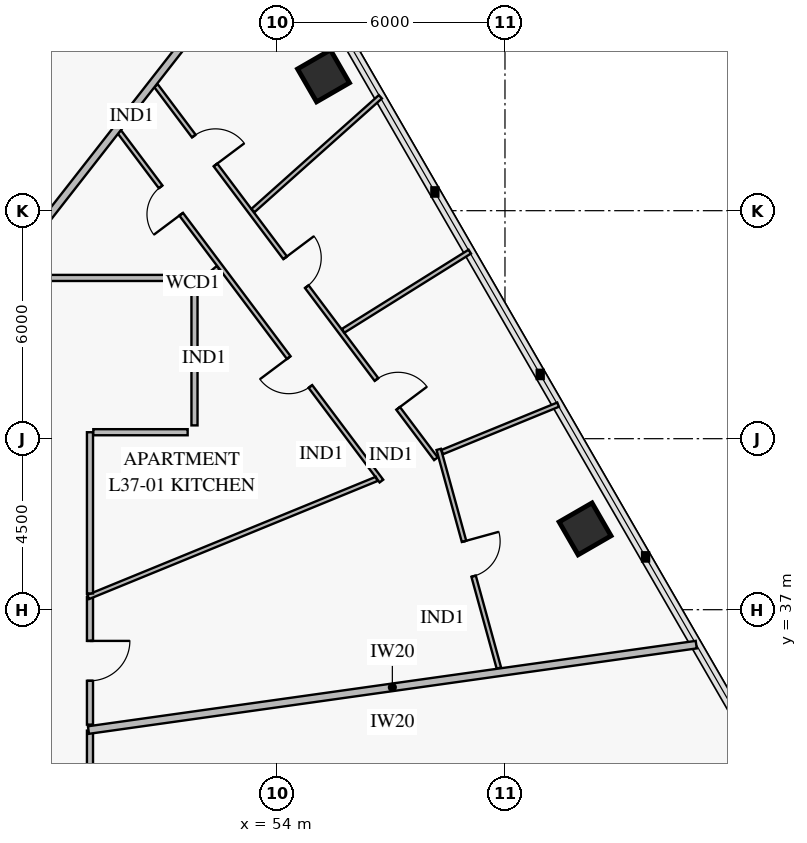
"""IFC4 building model, lengths in metres.
Left out: names, types, materials, properties, quantities, classifications, styles, units other than length and angle.
Written with IfcOpenShell. Run it as: python <this file> out.ifc"""

import sys

from ifc_helpers import new_model, si_unit, direction, frame, frame_2d, origin, origin_2d, place, context, subcontext, project, spatial, rectangle, extrude, element, fill, save


model = new_model("IFC4")
c1 = context("Model", 3, precision=1e-05, world=origin(), true_north=direction((0.0, 1.0)))
c2 = subcontext(c1, "Body", "Model", "MODEL_VIEW")
j1 = project(units=[si_unit("LENGTHUNIT", "METRE"), si_unit("PLANEANGLEUNIT", "RADIAN")], contexts=[c1])
p1 = place(None, origin())
s1 = spatial("IfcSite", under=j1, at=p1, CompositionType="ELEMENT")
p2 = place(p1, origin())
s2 = spatial("IfcBuilding", under=s1, at=p2, CompositionType="ELEMENT")
p3 = place(p2, frame((0.0, 0.0, 150.4)))
s3 = spatial("IfcBuildingStorey", under=s2, at=p3, CompositionType="ELEMENT", Elevation=150.4)
for number, where, z_axis, x_axis in (
    (1, (62.108, 39.126, 0.0), (0.0, 0.0, 1.0), (-0.5, 0.866, 0.0)),
    (2, (55.226, 51.047, 0.0), (0.0, 0.0, 1.0), (-0.5, 0.866, 0.0)),
):
    element("IfcColumn", number, at=place(p3, frame(where, z_axis=z_axis, x_axis=x_axis)), inside=s3, PredefinedType="COLUMN", context=c2, shape_type="SweptSolid", body=[
        extrude(rectangle(XDim=1.0, YDim=1.0, at=origin_2d()), origin(), (0.0, 0.0, 1.0), 3.55),
    ])
p4 = place(p3, frame((59.84, 35.462, 0.0), z_axis=(0.0, 0.0, 1.0), x_axis=(-0.265206859365, 0.964191537894, 0.0)))
e3 = element("IfcWall", 3, at=p4, inside=s3, PredefinedType="PARTITIONING", context=c2, shape_type="SweptSolid", body=[
    extrude(rectangle(XDim=5.97, YDim=0.12, at=frame_2d((2.985, 0.0))), origin(), (0.0, 0.0, 1.0), 2.9),
])
p5 = place(p4, frame((2.51, 0.0, 0.0)))
e4 = element("IfcOpeningElement", 4, at=p5, cuts=e3, PredefinedType="OPENING", context=c2, shape_type="SweptSolid", body=[
    extrude(rectangle(XDim=0.95, YDim=2.1, at=frame_2d((0.475, 1.05))), frame((0.0, 0.072, 0.0), z_axis=(0.0, -1.0, 0.0), x_axis=(1.0, 0.0, 0.0)), (0.0, 0.0, 1.0), 0.144),
])
p6 = place(p3, frame((56.748, 40.385, 0.0), z_axis=(0.0, 0.0, 1.0), x_axis=(-0.600156370002, 0.799882698616, 0.0)))
e5 = element("IfcWall", 5, at=p6, inside=s3, PredefinedType="PARTITIONING", context=c2, shape_type="SweptSolid", body=[
    extrude(rectangle(XDim=11.49, YDim=0.12, at=frame_2d((5.745, 0.0))), origin(), (0.0, 0.0, 1.0), 2.9),
])
p7 = place(p6, frame((3.112, 0.0, 0.0)))
e6 = element("IfcOpeningElement", 6, at=p7, cuts=e5, PredefinedType="OPENING", context=c2, shape_type="SweptSolid", body=[
    extrude(rectangle(XDim=0.95, YDim=2.1, at=frame_2d((0.475, 1.05))), frame((0.0, 0.072, 0.0), z_axis=(0.0, -1.0, 0.0), x_axis=(1.0, 0.0, 0.0)), (0.0, 0.0, 1.0), 0.144),
])
p8 = place(p6, frame((8.779, 0.0, 0.0)))
e7 = element("IfcOpeningElement", 7, at=p8, cuts=e5, PredefinedType="OPENING", context=c2, shape_type="SweptSolid", body=[
    extrude(rectangle(XDim=0.9, YDim=2.1, at=frame_2d((0.45, 1.05))), frame((0.0, 0.072, 0.0), z_axis=(0.0, -1.0, 0.0), x_axis=(1.0, 0.0, 0.0)), (0.0, 0.0, 1.0), 0.144),
])
p9 = place(p3, frame((58.183, 40.972, 0.0), z_axis=(0.0, 0.0, 1.0), x_axis=(-0.600136851624, 0.79989734299, 0.0)))
e8 = element("IfcWall", 8, at=p9, inside=s3, PredefinedType="PARTITIONING", context=c2, shape_type="SweptSolid", body=[
    extrude(rectangle(XDim=12.273, YDim=0.12, at=frame_2d((6.136, 0.0))), origin(), (0.0, 0.0, 1.0), 2.9),
])
p10 = place(p9, frame((1.657, 0.0, 0.0)))
e9 = element("IfcOpeningElement", 9, at=p10, cuts=e8, PredefinedType="OPENING", context=c2, shape_type="SweptSolid", body=[
    extrude(rectangle(XDim=0.95, YDim=2.1, at=frame_2d((0.475, 1.05))), frame((0.0, 0.072, 0.0), z_axis=(0.0, -1.0, 0.0), x_axis=(1.0, 0.0, 0.0)), (0.0, 0.0, 1.0), 0.144),
])
p11 = place(p9, frame((5.662, 0.0, 0.0)))
e10 = element("IfcOpeningElement", 10, at=p11, cuts=e8, PredefinedType="OPENING", context=c2, shape_type="SweptSolid", body=[
    extrude(rectangle(XDim=0.95, YDim=2.1, at=frame_2d((0.475, 1.05))), frame((0.0, 0.072, 0.0), z_axis=(0.0, -1.0, 0.0), x_axis=(1.0, 0.0, 0.0)), (0.0, 0.0, 1.0), 0.144),
])
p12 = place(p9, frame((9.666, 0.0, 0.0)))
e11 = element("IfcOpeningElement", 11, at=p12, cuts=e8, PredefinedType="OPENING", context=c2, shape_type="SweptSolid", body=[
    extrude(rectangle(XDim=0.95, YDim=2.1, at=frame_2d((0.475, 1.05))), frame((0.0, 0.072, 0.0), z_axis=(0.0, -1.0, 0.0), x_axis=(1.0, 0.0, 0.0)), (0.0, 0.0, 1.0), 0.144),
])
p13 = place(p3, frame((49.08, 33.975, 0.0), z_axis=(0.0, 0.0, 1.0), x_axis=(0.0, 1.0, 0.0)))
e12 = element("IfcWall", 12, at=p13, inside=s3, PredefinedType="PARTITIONING", context=c2, shape_type="SweptSolid", body=[
    extrude(rectangle(XDim=3.357, YDim=0.16, at=frame_2d((1.679, 0.0))), origin(), (0.0, 0.0, 1.0), 2.9),
])
p14 = place(p13, frame((1.154, 0.0, 0.0)))
e13 = element("IfcOpeningElement", 13, at=p14, cuts=e12, PredefinedType="OPENING", context=c2, shape_type="SweptSolid", body=[
    extrude(rectangle(XDim=1.05, YDim=2.15, at=frame_2d((0.525, 1.075))), frame((0.0, 0.092, 0.0), z_axis=(0.0, -1.0, 0.0), x_axis=(1.0, 0.0, 0.0)), (0.0, 0.0, 1.0), 0.184),
])
p15 = place(p3, frame((49.08, 30.8, 0.0), z_axis=(0.0, 0.0, 1.0), x_axis=(0.0, 1.0, 0.0)))
e14 = element("IfcWall", 14, at=p15, inside=s3, PredefinedType="PARTITIONING", context=c2, shape_type="SweptSolid", body=[
    extrude(rectangle(XDim=3.018, YDim=0.16, at=frame_2d((1.509, 0.0))), origin(), (0.0, 0.0, 1.0), 3.55),
])
p16 = place(p15, frame((0.934, 0.0, 0.0)))
e15 = element("IfcOpeningElement", 15, at=p16, cuts=e14, PredefinedType="OPENING", context=c2, shape_type="SweptSolid", body=[
    extrude(rectangle(XDim=1.15, YDim=2.2, at=frame_2d((0.575, 1.1))), frame((0.0, 0.092, 0.0), z_axis=(0.0, -1.0, 0.0), x_axis=(1.0, 0.0, 0.0)), (0.0, 0.0, 1.0), 0.184),
])
p17 = place(p3, frame((49.04, 33.833, 0.0), z_axis=(0.0, 0.0, 1.0), x_axis=(0.990268626923, 0.139169129232, 0.0)))
e16 = element("IfcWall", 16, at=p17, inside=s3, PredefinedType="PARTITIONING", context=c2, shape_type="SweptSolid", body=[
    extrude(rectangle(XDim=16.15, YDim=0.2, at=frame_2d((8.075, 0.0))), origin(), (0.0, 0.0, 1.0), 2.87),
])
p18 = place(p3, frame((51.78, 45.425, 0.0), z_axis=(0.0, 0.0, 1.0), x_axis=(0.761652645913, 0.647985529911, 0.0)))
e17 = element("IfcWall", 17, at=p18, inside=s3, PredefinedType="PARTITIONING", context=c2, shape_type="SweptSolid", body=[
    extrude(rectangle(XDim=0.883, YDim=0.12, at=frame_2d((0.441, 0.0))), origin(), (0.0, 0.0, 1.0), 3.55),
])
p19 = place(p3, frame((55.741, 44.339, 0.0), z_axis=(0.0, 0.0, 1.0), x_axis=(0.847998304005, 0.529998940003, 0.0)))
e18 = element("IfcWall", 18, at=p19, inside=s3, PredefinedType="PARTITIONING", context=c2, shape_type="SweptSolid", body=[
    extrude(rectangle(XDim=3.929, YDim=0.12, at=frame_2d((1.965, 0.0))), origin(), (0.0, 0.0, 1.0), 2.87),
])
p20 = place(p3, frame((53.368, 47.503, 0.0), z_axis=(0.0, 0.0, 1.0), x_axis=(0.746002225815, 0.665943450361, 0.0)))
e19 = element("IfcWall", 19, at=p20, inside=s3, PredefinedType="PARTITIONING", context=c2, shape_type="SweptSolid", body=[
    extrude(rectangle(XDim=4.495, YDim=0.12, at=frame_2d((2.248, 0.0))), origin(), (0.0, 0.0, 1.0), 2.87),
])
p21 = place(p3, frame((49.032, 37.334, 0.0), z_axis=(0.0, 0.0, 1.0), x_axis=(0.92547579993, 0.378806736666, 0.0)))
e20 = element("IfcWall", 20, at=p21, inside=s3, PredefinedType="PARTITIONING", context=c2, shape_type="SweptSolid", body=[
    extrude(rectangle(XDim=8.2, YDim=0.12, at=frame_2d((4.1, 0.0))), origin(), (0.0, 0.0, 1.0), 3.15),
])
p22 = place(p3, frame((58.347, 41.147, 0.0), z_axis=(0.0, 0.0, 1.0), x_axis=(0.925495037652, 0.378759732919, 0.0)))
e21 = element("IfcWall", 21, at=p22, inside=s3, PredefinedType="PARTITIONING", context=c2, shape_type="SweptSolid", body=[
    extrude(rectangle(XDim=3.296, YDim=0.12, at=frame_2d((1.648, 0.0))), origin(), (0.0, 0.0, 1.0), 2.87),
])
p23 = place(p3, frame((46.696, 45.69, 0.0), z_axis=(0.0, 0.0, 1.0), x_axis=(0.615655544117, 0.788015387539, 0.0)))
e22 = element("IfcWall", 22, at=p23, inside=s3, PredefinedType="PARTITIONING", context=c2, shape_type="SweptSolid", body=[
    extrude(rectangle(XDim=11.945, YDim=0.2, at=frame_2d((5.973, 0.0))), origin(), (0.0, 0.0, 1.0), 2.87),
])
p24 = place(p3, frame((49.08, 37.427, 0.0), z_axis=(0.0, 0.0, 1.0), x_axis=(0.0, 1.0, 0.0)))
e23 = element("IfcWall", 23, at=p24, inside=s3, PredefinedType="PARTITIONING", context=c2, shape_type="SweptSolid", body=[
    extrude(rectangle(XDim=4.243, YDim=0.16, at=frame_2d((2.121, 0.0))), origin(), (0.0, 0.0, 1.0), 3.55),
])
p25 = place(p3, frame((51.83, 41.85, 0.0), z_axis=(0.0, 0.0, 1.0), x_axis=(0.0, 1.0, 0.0)))
e24 = element("IfcWall", 24, at=p25, inside=s3, PredefinedType="PARTITIONING", context=c2, shape_type="SweptSolid", body=[
    extrude(rectangle(XDim=3.528, YDim=0.16, at=frame_2d((1.764, 0.0))), origin(), (0.0, 0.0, 1.0), 3.15),
])
p26 = place(p3, frame((49.168, 41.67, 0.0), z_axis=(0.0, 0.0, 1.0), x_axis=(1.0, 0.0, 0.0)))
e25 = element("IfcWall", 25, at=p26, inside=s3, PredefinedType="PARTITIONING", context=c2, shape_type="SweptSolid", body=[
    extrude(rectangle(XDim=2.482, YDim=0.16, at=frame_2d((1.241, 0.0))), origin(), (0.0, 0.0, 1.0), 3.55),
])
p27 = place(p3, frame((51.65, 45.73, 0.0), z_axis=(0.0, 0.0, 1.0), x_axis=(-1.0, 0.0, 0.0)))
e26 = element("IfcWall", 26, at=p27, inside=s3, PredefinedType="PARTITIONING", context=c2, shape_type="SweptSolid", body=[
    extrude(rectangle(XDim=4.703, YDim=0.16, at=frame_2d((2.352, 0.0))), origin(), (0.0, 0.0, 1.0), 2.9),
])
p28 = place(p5, frame((0.95, 0.0, 0.0), z_axis=(0.0, 0.0, 1.0), x_axis=(-1.0, 0.0, 0.0)))
e27 = element("IfcDoor", 27, at=p28, inside=s3, OperationType="SINGLE_SWING_LEFT", PredefinedType="DOOR", context=c2, shape_type="SweptSolid", body=[
    extrude(rectangle(XDim=0.95, YDim=2.1, at=frame_2d((0.475, 1.05))), frame((0.0, 0.025, 0.0), z_axis=(0.0, -1.0, 0.0), x_axis=(1.0, 0.0, 0.0)), (0.0, 0.0, 1.0), 0.05),
])
fill(e4, e27)
p29 = place(p7, origin())
e28 = element("IfcDoor", 28, at=p29, inside=s3, OperationType="SINGLE_SWING_RIGHT", PredefinedType="DOOR", context=c2, shape_type="SweptSolid", body=[
    extrude(rectangle(XDim=0.95, YDim=2.1, at=frame_2d((0.475, 1.05))), frame((0.0, 0.025, 0.0), z_axis=(0.0, -1.0, 0.0), x_axis=(1.0, 0.0, 0.0)), (0.0, 0.0, 1.0), 0.05),
])
fill(e6, e28)
p30 = place(p8, origin())
e29 = element("IfcDoor", 29, at=p30, inside=s3, OperationType="SINGLE_SWING_LEFT", PredefinedType="DOOR", context=c2, shape_type="SweptSolid", body=[
    extrude(rectangle(XDim=0.9, YDim=2.1, at=frame_2d((0.45, 1.05))), frame((0.0, 0.025, 0.0), z_axis=(0.0, -1.0, 0.0), x_axis=(1.0, 0.0, 0.0)), (0.0, 0.0, 1.0), 0.05),
])
fill(e7, e29)
p31 = place(p10, frame((0.95, 0.0, 0.0), z_axis=(0.0, 0.0, 1.0), x_axis=(-1.0, 0.0, 0.0)))
e30 = element("IfcDoor", 30, at=p31, inside=s3, OperationType="SINGLE_SWING_RIGHT", PredefinedType="DOOR", context=c2, shape_type="SweptSolid", body=[
    extrude(rectangle(XDim=0.95, YDim=2.1, at=frame_2d((0.475, 1.05))), frame((0.0, 0.025, 0.0), z_axis=(0.0, -1.0, 0.0), x_axis=(1.0, 0.0, 0.0)), (0.0, 0.0, 1.0), 0.05),
])
fill(e9, e30)
p32 = place(p11, frame((0.95, 0.0, 0.0), z_axis=(0.0, 0.0, 1.0), x_axis=(-1.0, 0.0, 0.0)))
e31 = element("IfcDoor", 31, at=p32, inside=s3, OperationType="SINGLE_SWING_LEFT", PredefinedType="DOOR", context=c2, shape_type="SweptSolid", body=[
    extrude(rectangle(XDim=0.95, YDim=2.1, at=frame_2d((0.475, 1.05))), frame((0.0, 0.025, 0.0), z_axis=(0.0, -1.0, 0.0), x_axis=(1.0, 0.0, 0.0)), (0.0, 0.0, 1.0), 0.05),
])
fill(e10, e31)
p33 = place(p12, frame((0.95, 0.0, 0.0), z_axis=(0.0, 0.0, 1.0), x_axis=(-1.0, 0.0, 0.0)))
e32 = element("IfcDoor", 32, at=p33, inside=s3, OperationType="SINGLE_SWING_RIGHT", PredefinedType="DOOR", context=c2, shape_type="SweptSolid", body=[
    extrude(rectangle(XDim=0.95, YDim=2.1, at=frame_2d((0.475, 1.05))), frame((0.0, 0.025, 0.0), z_axis=(0.0, -1.0, 0.0), x_axis=(1.0, 0.0, 0.0)), (0.0, 0.0, 1.0), 0.05),
])
fill(e11, e32)
p34 = place(p14, frame((1.05, 0.0, 0.0), z_axis=(0.0, 0.0, 1.0), x_axis=(-1.0, 0.0, 0.0)))
e33 = element("IfcDoor", 33, at=p34, inside=s3, OperationType="SINGLE_SWING_LEFT", PredefinedType="DOOR", context=c2, shape_type="SweptSolid", body=[
    extrude(rectangle(XDim=1.05, YDim=2.15, at=frame_2d((0.525, 1.075))), frame((0.0, 0.025, 0.0), z_axis=(0.0, -1.0, 0.0), x_axis=(1.0, 0.0, 0.0)), (0.0, 0.0, 1.0), 0.05),
])
fill(e13, e33)
save(model, sys.argv[1])
